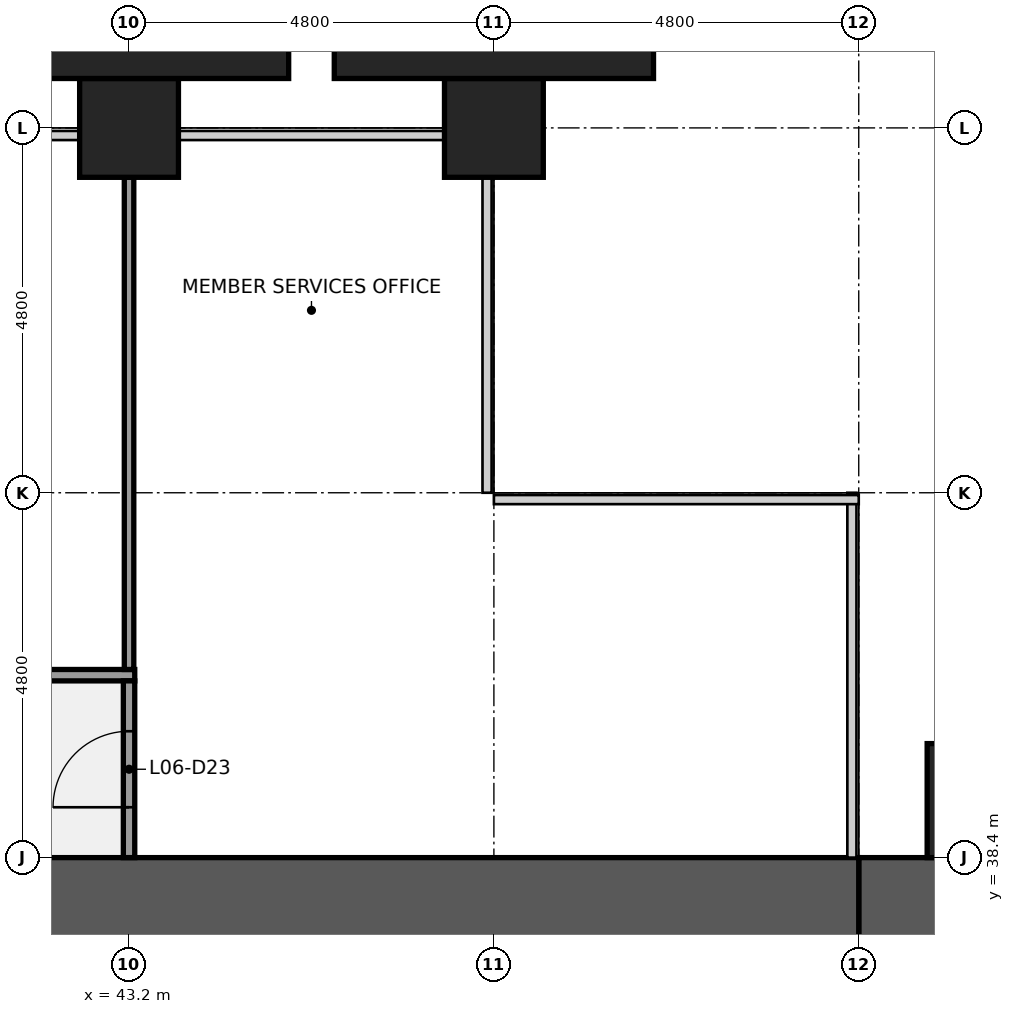
"""IFC4 building model, lengths in metres.
Left out: names, types, materials, properties, quantities, classifications, styles, units other than length and angle.
Written with IfcOpenShell. Run it as: python <this file> out.ifc"""

import sys

from ifc_helpers import new_model, si_unit, direction, frame, frame_2d, origin, origin_2d, place, context, subcontext, project, spatial, rectangle, extrude, element, fill, save


model = new_model("IFC4")
c1 = context("Model", 3, precision=1e-05, world=origin(), true_north=direction((0.0, 1.0)))
c2 = subcontext(c1, "Body", "Model", "MODEL_VIEW")
j1 = project(units=[si_unit("LENGTHUNIT", "METRE"), si_unit("PLANEANGLEUNIT", "RADIAN")], contexts=[c1])
p1 = place(None, origin())
s1 = spatial("IfcSite", under=j1, at=p1, CompositionType="ELEMENT")
p2 = place(p1, origin())
s2 = spatial("IfcBuilding", under=s1, at=p2, CompositionType="ELEMENT")
p3 = place(p2, frame((0.0, 0.0, 34.6)))
s3 = spatial("IfcBuildingStorey", under=s2, at=p3, CompositionType="ELEMENT", Elevation=34.6)
for number, where, z_axis, x_axis in (
    (1, (43.2, 48.0, 0.0), (0.0, 0.0, 1.0), (1.0, 0.0, 0.0)),
    (2, (48.0, 48.0, 0.0), (0.0, 0.0, 1.0), (1.0, 0.0, 0.0)),
):
    element("IfcColumn", number, at=place(p3, frame(where, z_axis=z_axis, x_axis=x_axis)), inside=s3, PredefinedType="COLUMN", context=c2, shape_type="SweptSolid", body=[
        extrude(rectangle(XDim=1.3, YDim=1.3, at=origin_2d()), origin(), (0.0, 0.0, 1.0), 4.4),
    ])
p4 = place(p3, frame((52.8, 37.8, 0.0), z_axis=(0.0, 0.0, 1.0), x_axis=(1.0, 0.0, 0.0)))
e3 = element("IfcWall", 3, at=p4, inside=s3, PredefinedType="SHEAR", context=c2, shape_type="SweptSolid", body=[
    extrude(rectangle(XDim=3.6, YDim=1.2, at=frame_2d((1.8, 0.0))), origin(), (0.0, 0.0, 1.0), 4.24),
])
p5 = place(p3, frame((39.6, 37.8, 0.0), z_axis=(0.0, 0.0, 1.0), x_axis=(1.0, 0.0, 0.0)))
e4 = element("IfcWall", 4, at=p5, inside=s3, PredefinedType="SHEAR", context=c2, shape_type="SweptSolid", body=[
    extrude(rectangle(XDim=13.2, YDim=1.2, at=frame_2d((6.6, 0.0))), origin(), (0.0, 0.0, 1.0), 4.24),
])
p6 = place(p5, frame((0.65, 0.0, 0.0)))
e5 = element("IfcOpeningElement", 5, at=p6, cuts=e4, PredefinedType="OPENING", context=c2, shape_type="SweptSolid", body=[
    extrude(rectangle(XDim=1.1, YDim=2.1, at=frame_2d((0.55, 1.05))), frame((0.0, 0.61, 0.0), z_axis=(0.0, -1.0, 0.0), x_axis=(1.0, 0.0, 0.0)), (0.0, 0.0, 1.0), 1.22),
])
p7 = place(p3, frame((38.325, 40.8, 0.0), z_axis=(0.0, 0.0, 1.0), x_axis=(1.0, 0.0, 0.0)))
e6 = element("IfcWall", 6, at=p7, inside=s3, PredefinedType="PARTITIONING", context=c2, shape_type="SweptSolid", body=[
    extrude(rectangle(XDim=4.95, YDim=0.15, at=frame_2d((2.475, 0.0))), origin(), (0.0, 0.0, 1.0), 3.27),
])
p8 = place(p7, frame((1.975, 0.0, 0.0)))
e7 = element("IfcOpeningElement", 7, at=p8, cuts=e6, PredefinedType="OPENING", context=c2, shape_type="SweptSolid", body=[
    extrude(rectangle(XDim=1.0, YDim=2.1, at=frame_2d((0.5, 1.05))), frame((0.0, 0.085, 0.0), z_axis=(0.0, -1.0, 0.0), x_axis=(1.0, 0.0, 0.0)), (0.0, 0.0, 1.0), 0.17),
])
p9 = place(p3, frame((43.2, 40.875, 0.0), z_axis=(0.0, 0.0, 1.0), x_axis=(0.0, 1.0, 0.0)))
e8 = element("IfcWall", 8, at=p9, inside=s3, PredefinedType="PARTITIONING", context=c2, shape_type="SweptSolid", body=[
    extrude(rectangle(XDim=6.475, YDim=0.125, at=frame_2d((3.238, 0.0))), origin(), (0.0, 0.0, 1.0), 3.27),
])
p10 = place(p3, frame((43.2, 38.4, 0.0), z_axis=(0.0, 0.0, 1.0), x_axis=(0.0, 1.0, 0.0)))
e9 = element("IfcWall", 9, at=p10, inside=s3, PredefinedType="PARTITIONING", context=c2, shape_type="SweptSolid", body=[
    extrude(rectangle(XDim=2.325, YDim=0.15, at=frame_2d((1.163, 0.0))), origin(), (0.0, 0.0, 1.0), 3.27),
])
p11 = place(p10, frame((0.663, 0.0, 0.0)))
e10 = element("IfcOpeningElement", 10, at=p11, cuts=e9, PredefinedType="OPENING", context=c2, shape_type="SweptSolid", body=[
    extrude(rectangle(XDim=1.0, YDim=2.1, at=frame_2d((0.5, 1.05))), frame((0.0, 0.085, 0.0), z_axis=(0.0, -1.0, 0.0), x_axis=(1.0, 0.0, 0.0)), (0.0, 0.0, 1.0), 0.17),
])
p12 = place(p3, frame((55.2, 39.15, 0.0), z_axis=(0.0, 0.0, 1.0), x_axis=(1.0, 0.0, 0.0)))
e11 = element("IfcColumn", 11, at=p12, inside=s3, PredefinedType="PILASTER", context=c2, shape_type="SweptSolid", body=[
    extrude(rectangle(XDim=3.0, YDim=1.5, at=origin_2d()), origin(), (0.0, 0.0, 1.0), 4.4),
])
for number, where, z_axis, x_axis in (
    (12, (43.2, 49.075, 0.0), (0.0, 0.0, 1.0), (1.0, 0.0, 0.0)),
    (13, (48.0, 49.075, 0.0), (0.0, 0.0, 1.0), (1.0, 0.0, 0.0)),
):
    element("IfcColumn", number, at=place(p3, frame(where, z_axis=z_axis, x_axis=x_axis)), inside=s3, PredefinedType="PILASTER", context=c2, shape_type="SweptSolid", body=[
        extrude(rectangle(XDim=4.2, YDim=0.85, at=origin_2d()), origin(), (0.0, 0.0, 1.0), 4.4),
    ])
p13 = place(p11, origin())
e14 = element("IfcDoor", 14, at=p13, inside=s3, OperationType="SINGLE_SWING_LEFT", PredefinedType="DOOR", context=c2, shape_type="SweptSolid", body=[
    extrude(rectangle(XDim=1.0, YDim=2.1, at=frame_2d((0.5, 1.05))), frame((0.0, 0.025, 0.0), z_axis=(0.0, -1.0, 0.0), x_axis=(1.0, 0.0, 0.0)), (0.0, 0.0, 1.0), 0.05),
])
fill(e10, e14)
save(model, sys.argv[1])
